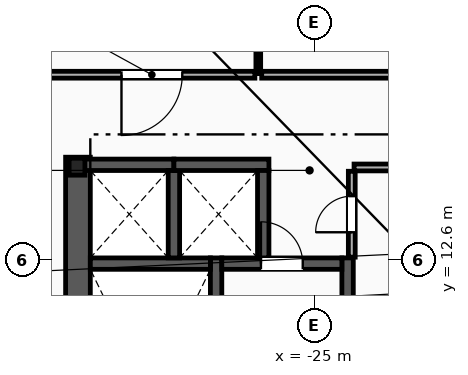
"""IFC4 building model, lengths in metres.
Left out: names, types, materials, properties, quantities, classifications, styles, units other than length and angle.
Written with IfcOpenShell. Run it as: python <this file> out.ifc"""

import sys

from ifc_helpers import new_model, si_unit, direction, frame, frame_2d, origin, origin_2d, place, context, subcontext, project, spatial, rectangle, i_section, extrude, element, fill, save


model = new_model("IFC4")
c1 = context("Model", 3, precision=1e-05, world=origin(), true_north=direction((0.0, 1.0)))
c2 = subcontext(c1, "Body", "Model", "MODEL_VIEW")
j1 = project(units=[si_unit("LENGTHUNIT", "METRE"), si_unit("PLANEANGLEUNIT", "RADIAN")], contexts=[c1])
p1 = place(None, origin())
s1 = spatial("IfcSite", under=j1, at=p1, CompositionType="ELEMENT")
p2 = place(p1, origin())
s2 = spatial("IfcBuilding", under=s1, at=p2, CompositionType="ELEMENT")
p3 = place(p2, frame((0.0, 0.0, 195.4)))
s3 = spatial("IfcBuildingStorey", under=s2, at=p3, CompositionType="ELEMENT", Elevation=195.4)
p4 = place(p3, frame((-31.25, 15.05, 0.0), z_axis=(0.0, 0.0, 1.0), x_axis=(1.0, 0.0, 0.0)))
e1 = element("IfcColumn", 1, at=p4, inside=s3, PredefinedType="COLUMN", context=c2, shape_type="SweptSolid", body=[
    extrude(i_section(OverallWidth=0.416, OverallDepth=0.446, WebThickness=0.039, FlangeThickness=0.063, FilletRadius=0.018, at=origin_2d()), origin(), (0.0, 0.0, 1.0), 3.6),
])
p5 = place(p3, frame((-31.225, 1.97, 0.0), z_axis=(0.0, 0.0, 1.0), x_axis=(0.0, 1.0, 0.0)))
e2 = element("IfcWall", 2, at=p5, inside=s3, PredefinedType="SHEAR", context=c2, shape_type="SweptSolid", body=[
    extrude(rectangle(XDim=13.33, YDim=0.65, at=frame_2d((6.665, 0.0))), origin(), (0.0, 0.0, 1.0), 3.34),
])
for number, where, z_axis, x_axis in (
    (3, (-27.59, 1.97, 0.0), (0.0, 0.0, 1.0), (0.0, 1.0, 0.0)),
    (4, (-24.13, 1.97, 0.0), (0.0, 0.0, 1.0), (0.0, 1.0, 0.0)),
):
    element("IfcWall", number, at=place(p3, frame(where, z_axis=z_axis, x_axis=x_axis)), inside=s3, PredefinedType="SHEAR", context=c2, shape_type="SweptSolid", body=[
        extrude(rectangle(XDim=10.68, YDim=0.3, at=frame_2d((5.34, 0.0))), origin(), (0.0, 0.0, 1.0), 3.34),
    ])
p6 = place(p3, frame((-30.9, 12.5, 0.0), z_axis=(0.0, 0.0, 1.0), x_axis=(1.0, 0.0, 0.0)))
e5 = element("IfcWall", 5, at=p6, inside=s3, PredefinedType="SHEAR", context=c2, shape_type="SweptSolid", body=[
    extrude(rectangle(XDim=3.16, YDim=0.3, at=frame_2d((1.58, 0.0))), origin(), (0.0, 0.0, 1.0), 3.34),
])
p7 = place(p3, frame((-27.44, 12.5, 0.0), z_axis=(0.0, 0.0, 1.0), x_axis=(1.0, 0.0, 0.0)))
e6 = element("IfcWall", 6, at=p7, inside=s3, PredefinedType="SHEAR", context=c2, shape_type="SweptSolid", body=[
    extrude(rectangle(XDim=3.16, YDim=0.3, at=frame_2d((1.58, 0.0))), origin(), (0.0, 0.0, 1.0), 3.34),
])
p8 = place(p7, frame((1.03, 0.0, 0.0)))
e7 = element("IfcOpeningElement", 7, at=p8, cuts=e6, PredefinedType="OPENING", context=c2, shape_type="SweptSolid", body=[
    extrude(rectangle(XDim=1.1, YDim=2.15, at=frame_2d((0.55, 1.075))), frame((0.0, 0.16, 0.0), z_axis=(0.0, -1.0, 0.0), x_axis=(1.0, 0.0, 0.0)), (0.0, 0.0, 1.0), 0.32),
])
p9 = place(p3, frame((-31.2, 15.1, 0.0), z_axis=(0.0, 0.0, 1.0), x_axis=(1.0, 0.0, 0.0)))
e8 = element("IfcWall", 8, at=p9, inside=s3, PredefinedType="SHEAR", context=c2, shape_type="SweptSolid", body=[
    extrude(rectangle(XDim=2.5, YDim=0.3, at=frame_2d((1.25, 0.0))), origin(), (0.0, 0.0, 1.0), 3.34),
])
p10 = place(p3, frame((-28.7, 12.65, 0.0), z_axis=(0.0, 0.0, 1.0), x_axis=(0.0, 1.0, 0.0)))
e9 = element("IfcWall", 9, at=p10, inside=s3, PredefinedType="SHEAR", context=c2, shape_type="SweptSolid", body=[
    extrude(rectangle(XDim=2.3, YDim=0.3, at=frame_2d((1.15, 0.0))), origin(), (0.0, 0.0, 1.0), 3.34),
])
p11 = place(p3, frame((-28.7, 15.1, 0.0), z_axis=(0.0, 0.0, 1.0), x_axis=(1.0, 0.0, 0.0)))
e10 = element("IfcWall", 10, at=p11, inside=s3, PredefinedType="SHEAR", context=c2, shape_type="SweptSolid", body=[
    extrude(rectangle(XDim=2.5, YDim=0.3, at=frame_2d((1.25, 0.0))), origin(), (0.0, 0.0, 1.0), 3.34),
])
p12 = place(p3, frame((-26.35, 12.65, 0.0), z_axis=(0.0, 0.0, 1.0), x_axis=(0.0, 1.0, 0.0)))
e11 = element("IfcWall", 11, at=p12, inside=s3, PredefinedType="SHEAR", context=c2, shape_type="SweptSolid", body=[
    extrude(rectangle(XDim=2.3, YDim=0.3, at=frame_2d((1.15, 0.0))), origin(), (0.0, 0.0, 1.0), 3.34),
])
p13 = place(p3, frame((-23.96, 15.03, 0.0), z_axis=(0.0, 0.0, 1.0), x_axis=(1.0, 0.0, 0.0)))
e12 = element("IfcWall", 12, at=p13, inside=s3, PredefinedType="PARTITIONING", context=c2, shape_type="SweptSolid", body=[
    extrude(rectangle(XDim=2.61, YDim=0.18, at=frame_2d((1.305, 0.0))), origin(), (0.0, 0.0, 1.0), 2.413),
])
p14 = place(p3, frame((-24.02, 12.67, 0.0), z_axis=(0.0, 0.0, 1.0), x_axis=(0.0, 1.0, 0.0)))
e13 = element("IfcWall", 13, at=p14, inside=s3, PredefinedType="PARTITIONING", context=c2, shape_type="SweptSolid", body=[
    extrude(rectangle(XDim=2.26, YDim=0.18, at=frame_2d((1.13, 0.0))), origin(), (0.0, 0.0, 1.0), 3.34),
])
p15 = place(p14, frame((0.655, 0.0, 0.0)))
e14 = element("IfcOpeningElement", 14, at=p15, cuts=e13, PredefinedType="OPENING", context=c2, shape_type="SweptSolid", body=[
    extrude(rectangle(XDim=0.95, YDim=2.1, at=frame_2d((0.475, 1.05))), frame((0.0, 0.1, 0.0), z_axis=(0.0, -1.0, 0.0), x_axis=(1.0, 0.0, 0.0)), (0.0, 0.0, 1.0), 0.2),
])
p16 = place(p3, frame((-26.48, 17.5, 0.0), z_axis=(0.0, 0.0, 1.0), x_axis=(0.0, 1.0, 0.0)))
e15 = element("IfcWall", 15, at=p16, inside=s3, PredefinedType="PARTITIONING", context=c2, shape_type="SweptSolid", body=[
    extrude(rectangle(XDim=6.961, YDim=0.125, at=frame_2d((3.48, 0.0))), origin(), (0.0, 0.0, 1.0), 3.34),
])
p17 = place(p3, frame((-16.822, 17.47, 0.0), z_axis=(0.0, 0.0, 1.0), x_axis=(-1.0, 0.0, 0.0)))
e16 = element("IfcWall", 16, at=p17, inside=s3, PredefinedType="PARTITIONING", context=c2, shape_type="SweptSolid", body=[
    extrude(rectangle(XDim=9.568, YDim=0.18, at=frame_2d((4.784, 0.0))), origin(), (0.0, 0.0, 1.0), 3.34),
])
p18 = place(p17, frame((4.284, 0.0, 0.0)))
e17 = element("IfcOpeningElement", 17, at=p18, cuts=e16, PredefinedType="OPENING", context=c2, shape_type="SweptSolid", body=[
    extrude(rectangle(XDim=1.0, YDim=2.15, at=frame_2d((0.5, 1.075))), frame((0.0, 0.1, 0.0), z_axis=(0.0, -1.0, 0.0), x_axis=(1.0, 0.0, 0.0)), (0.0, 0.0, 1.0), 0.2),
])
p19 = place(p3, frame((-26.57, 17.47, 0.0), z_axis=(0.0, 0.0, 1.0), x_axis=(-1.0, 0.0, 0.0)))
e18 = element("IfcWall", 18, at=p19, inside=s3, PredefinedType="PARTITIONING", context=c2, shape_type="SweptSolid", body=[
    extrude(rectangle(XDim=5.42, YDim=0.18, at=frame_2d((2.71, 0.0))), origin(), (0.0, 0.0, 1.0), 3.34),
])
p20 = place(p19, frame((1.91, 0.0, 0.0)))
e19 = element("IfcOpeningElement", 19, at=p20, cuts=e18, PredefinedType="OPENING", context=c2, shape_type="SweptSolid", body=[
    extrude(rectangle(XDim=1.6, YDim=2.2, at=frame_2d((0.8, 1.1))), frame((0.0, 0.1, 0.0), z_axis=(0.0, -1.0, 0.0), x_axis=(1.0, 0.0, 0.0)), (0.0, 0.0, 1.0), 0.2),
])
p21 = place(p8, origin())
e20 = element("IfcDoor", 20, at=p21, inside=s3, OperationType="SINGLE_SWING_LEFT", PredefinedType="DOOR", context=c2, shape_type="SweptSolid", body=[
    extrude(rectangle(XDim=1.1, YDim=2.15, at=frame_2d((0.55, 1.075))), frame((0.0, 0.025, 0.0), z_axis=(0.0, -1.0, 0.0), x_axis=(1.0, 0.0, 0.0)), (0.0, 0.0, 1.0), 0.05),
])
fill(e7, e20)
p22 = place(p20, origin())
e21 = element("IfcDoor", 21, at=p22, inside=s3, OperationType="SINGLE_SWING_RIGHT", PredefinedType="DOOR", context=c2, shape_type="SweptSolid", body=[
    extrude(rectangle(XDim=1.6, YDim=2.2, at=frame_2d((0.8, 1.1))), frame((0.0, 0.025, 0.0), z_axis=(0.0, -1.0, 0.0), x_axis=(1.0, 0.0, 0.0)), (0.0, 0.0, 1.0), 0.05),
])
fill(e19, e21)
p23 = place(p15, origin())
e22 = element("IfcDoor", 22, at=p23, inside=s3, OperationType="SINGLE_SWING_LEFT", PredefinedType="DOOR", context=c2, shape_type="SweptSolid", body=[
    extrude(rectangle(XDim=0.95, YDim=2.1, at=frame_2d((0.475, 1.05))), frame((0.0, 0.025, 0.0), z_axis=(0.0, -1.0, 0.0), x_axis=(1.0, 0.0, 0.0)), (0.0, 0.0, 1.0), 0.05),
])
fill(e14, e22)
save(model, sys.argv[1])
